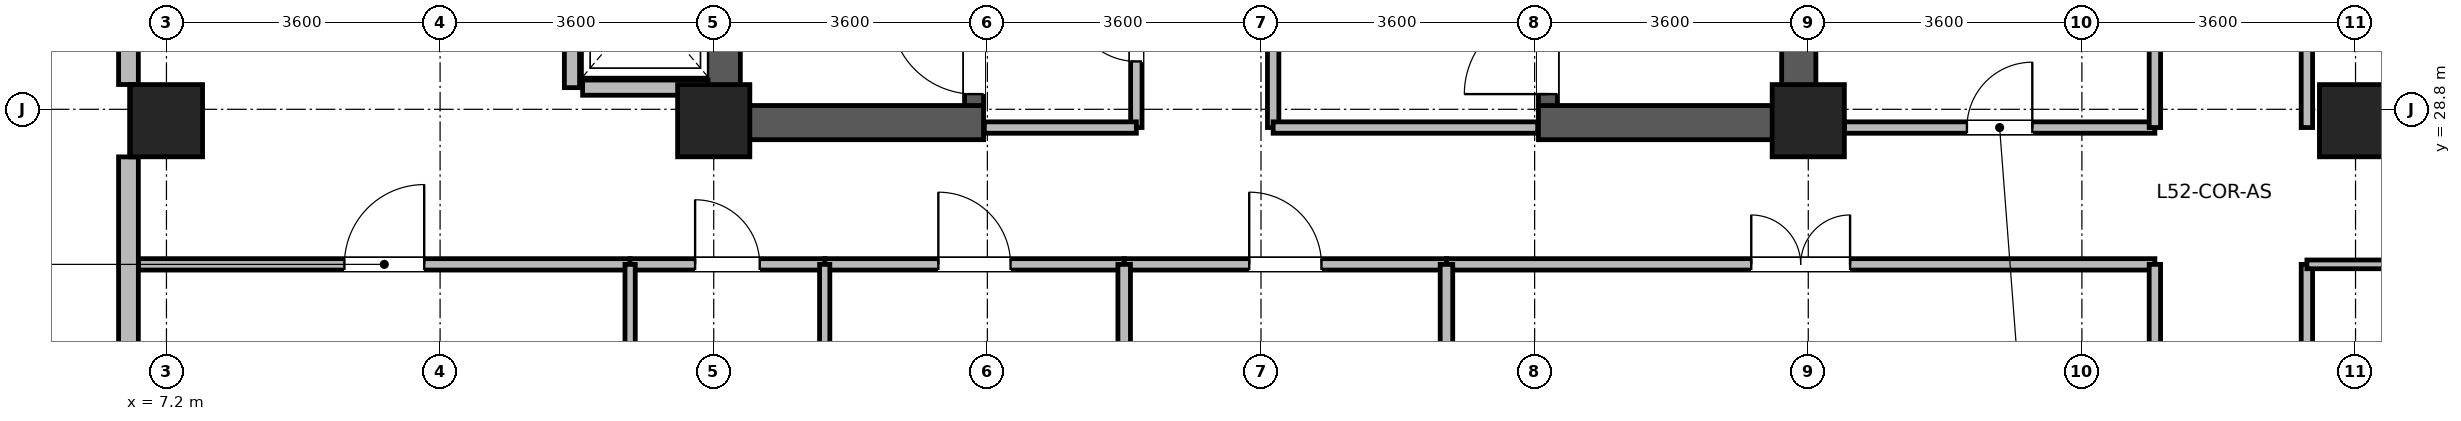
"""IFC4 building model, lengths in metres.
Left out: names, types, materials, properties, quantities, classifications, styles, units other than length and angle.
Written with IfcOpenShell. Run it as: python <this file> out.ifc"""

import sys

from ifc_helpers import new_model, si_unit, direction, frame, frame_2d, origin, origin_2d, place, context, subcontext, project, spatial, rectangle, extrude, source, transform, mapped, element, fill, save


model = new_model("IFC4")
c1 = context("Model", 3, precision=1e-05, world=origin(), true_north=direction((0.0, 1.0)))
c2 = subcontext(c1, "Body", "Model", "MODEL_VIEW")
j1 = project(units=[si_unit("LENGTHUNIT", "METRE"), si_unit("PLANEANGLEUNIT", "RADIAN")], contexts=[c1])
p1 = place(None, origin())
s1 = spatial("IfcSite", under=j1, at=p1, CompositionType="ELEMENT")
p2 = place(p1, origin())
s2 = spatial("IfcBuilding", under=s1, at=p2, CompositionType="ELEMENT")
p3 = place(p2, frame((0.0, 0.0, 205.5)))
s3 = spatial("IfcBuildingStorey", under=s2, at=p3, CompositionType="ELEMENT", Elevation=205.5)
for number, where, z_axis, x_axis in (
    (1, (14.525, 28.4, 0.0), (0.0, 0.0, 1.0), (0.0, 1.0, 0.0)),
    (2, (28.675, 28.4, 0.0), (0.0, 0.0, 1.0), (0.0, 1.0, 0.0)),
):
    element("IfcWall", number, at=place(p3, frame(where, z_axis=z_axis, x_axis=x_axis)), inside=s3, PredefinedType="SHEAR", context=c2, shape_type="SweptSolid", body=[
        extrude(rectangle(XDim=7.9, YDim=0.45, at=frame_2d((3.95, 0.0))), origin(), (0.0, 0.0, 1.0), 3.47),
    ])
for number, where, z_axis, x_axis in (
    (3, (14.75, 28.625, 0.0), (0.0, 0.0, 1.0), (1.0, 0.0, 0.0)),
    (4, (25.25, 28.625, 0.0), (0.0, 0.0, 1.0), (1.0, 0.0, 0.0)),
):
    element("IfcWall", number, at=place(p3, frame(where, z_axis=z_axis, x_axis=x_axis)), inside=s3, PredefinedType="SHEAR", context=c2, shape_type="SweptSolid", body=[
        extrude(rectangle(XDim=3.2, YDim=0.45, at=frame_2d((1.6, 0.0))), origin(), (0.0, 0.0, 1.0), 3.47),
    ])
p4 = place(p3, frame((17.825, 28.85, 0.0), z_axis=(0.0, 0.0, 1.0), x_axis=(0.0, 1.0, 0.0)))
e5 = element("IfcWall", 5, at=p4, inside=s3, PredefinedType="SHEAR", context=c2, shape_type="SweptSolid", body=[
    extrude(rectangle(XDim=7.0, YDim=0.25, at=frame_2d((3.5, 0.0))), origin(), (0.0, 0.0, 1.0), 3.47),
])
p5 = place(p4, frame((0.15, 0.0, 0.0)))
e6 = element("IfcOpeningElement", 6, at=p5, cuts=e5, PredefinedType="OPENING", context=c2, shape_type="SweptSolid", body=[
    extrude(rectangle(XDim=1.1, YDim=2.08, at=frame_2d((0.55, 1.04))), frame((0.0, 0.135, 0.0), z_axis=(0.0, -1.0, 0.0), x_axis=(1.0, 0.0, 0.0)), (0.0, 0.0, 1.0), 0.27),
])
p6 = place(p3, frame((25.375, 28.85, 0.0), z_axis=(0.0, 0.0, 1.0), x_axis=(0.0, 1.0, 0.0)))
e7 = element("IfcWall", 7, at=p6, inside=s3, PredefinedType="SHEAR", context=c2, shape_type="SweptSolid", body=[
    extrude(rectangle(XDim=7.0, YDim=0.25, at=frame_2d((3.5, 0.0))), origin(), (0.0, 0.0, 1.0), 3.47),
])
p7 = place(p6, frame((0.15, 0.0, 0.0)))
e8 = element("IfcOpeningElement", 8, at=p7, cuts=e7, PredefinedType="OPENING", context=c2, shape_type="SweptSolid", body=[
    extrude(rectangle(XDim=1.1, YDim=2.08, at=frame_2d((0.55, 1.04))), frame((0.0, 0.135, 0.0), z_axis=(0.0, -1.0, 0.0), x_axis=(1.0, 0.0, 0.0)), (0.0, 0.0, 1.0), 0.27),
])
m1 = source(origin(), c2, "Body", "SweptSolid", [
    extrude(rectangle(XDim=0.95, YDim=0.95, at=origin_2d()), origin(), (0.0, 0.0, 1.0), 3.7),
])
for number, where, z_axis, x_axis in (
    (9, (7.2, 28.65, 0.0), (0.0, 0.0, 1.0), (1.0, 0.0, 0.0)),
    (10, (14.4, 28.65, 0.0), (0.0, 0.0, 1.0), (1.0, 0.0, 0.0)),
    (11, (28.8, 28.65, 0.0), (0.0, 0.0, 1.0), (1.0, 0.0, 0.0)),
    (12, (36.0, 28.65, 0.0), (0.0, 0.0, 1.0), (1.0, 0.0, 0.0)),
):
    element("IfcColumn", number, at=place(p3, frame(where, z_axis=z_axis, x_axis=x_axis)), inside=s3, PredefinedType="COLUMN", context=c2, shape_type="MappedRepresentation", body=[
        mapped(m1, transform((0.0, 0.0, 0.0), x_axis=(1.0, 0.0, 0.0), y_axis=(0.0, 1.0, 0.0), z_axis=(0.0, 0.0, 1.0), scale=1.0)),
    ])
p8 = place(p3, frame((6.7, 29.126, 0.0), z_axis=(0.0, 0.0, 1.0), x_axis=(0.0, 1.0, 0.0)))
e13 = element("IfcWall", 13, at=p8, inside=s3, PredefinedType="STANDARD", context=c2, shape_type="SweptSolid", body=[
    extrude(rectangle(XDim=6.548, YDim=0.26, at=frame_2d((3.274, 0.0))), origin(), (0.0, 0.0, 1.0), 3.45),
])
p9 = place(p8, frame((0.737, 0.0, 0.85)))
e14 = element("IfcOpeningElement", 14, at=p9, cuts=e13, PredefinedType="OPENING", context=c2, shape_type="SweptSolid", body=[
    extrude(rectangle(XDim=1.8, YDim=1.85, at=frame_2d((0.9, 0.925))), frame((0.0, 0.14, 0.0), z_axis=(0.0, -1.0, 0.0), x_axis=(1.0, 0.0, 0.0)), (0.0, 0.0, 1.0), 0.28),
])
p10 = place(p8, frame((4.011, 0.0, 0.85)))
e15 = element("IfcOpeningElement", 15, at=p10, cuts=e13, PredefinedType="OPENING", context=c2, shape_type="SweptSolid", body=[
    extrude(rectangle(XDim=1.8, YDim=1.85, at=frame_2d((0.9, 0.925))), frame((0.0, 0.14, 0.0), z_axis=(0.0, -1.0, 0.0), x_axis=(1.0, 0.0, 0.0)), (0.0, 0.0, 1.0), 0.28),
])
p11 = place(p3, frame((6.7, 21.47, 0.0), z_axis=(0.0, 0.0, 1.0), x_axis=(0.0, 1.0, 0.0)))
e16 = element("IfcWall", 16, at=p11, inside=s3, PredefinedType="STANDARD", context=c2, shape_type="SweptSolid", body=[
    extrude(rectangle(XDim=6.704, YDim=0.26, at=frame_2d((3.352, 0.0))), origin(), (0.0, 0.0, 1.0), 3.45),
])
p12 = place(p11, frame((0.776, 0.0, 0.85)))
e17 = element("IfcOpeningElement", 17, at=p12, cuts=e16, PredefinedType="OPENING", context=c2, shape_type="SweptSolid", body=[
    extrude(rectangle(XDim=1.8, YDim=1.85, at=frame_2d((0.9, 0.925))), frame((0.0, 0.14, 0.0), z_axis=(0.0, -1.0, 0.0), x_axis=(1.0, 0.0, 0.0)), (0.0, 0.0, 1.0), 0.28),
])
p13 = place(p11, frame((2.877, 0.0, 0.85)))
e18 = element("IfcOpeningElement", 18, at=p13, cuts=e16, PredefinedType="OPENING", context=c2, shape_type="SweptSolid", body=[
    extrude(rectangle(XDim=0.95, YDim=1.75, at=frame_2d((0.475, 0.875))), frame((0.0, 0.14, 0.0), z_axis=(0.0, -1.0, 0.0), x_axis=(1.0, 0.0, 0.0)), (0.0, 0.0, 1.0), 0.28),
])
p14 = place(p3, frame((12.675, 29.085, 0.0), z_axis=(0.0, 0.0, 1.0), x_axis=(1.0, 0.0, 0.0)))
e19 = element("IfcWall", 19, at=p14, inside=s3, PredefinedType="PARTITIONING", context=c2, shape_type="SweptSolid", body=[
    extrude(rectangle(XDim=1.65, YDim=0.2, at=frame_2d((0.825, 0.0))), origin(), (0.0, 0.0, 1.0), 3.45),
])
p15 = place(p3, frame((12.535, 29.085, 0.0), z_axis=(0.0, 0.0, 1.0), x_axis=(0.0, 1.0, 0.0)))
e20 = element("IfcWall", 20, at=p15, inside=s3, PredefinedType="PARTITIONING", context=c2, shape_type="SweptSolid", body=[
    extrude(rectangle(XDim=2.23, YDim=0.2, at=frame_2d((1.115, 0.0))), origin(), (0.0, 0.0, 1.0), 3.45),
])
p16 = place(p3, frame((35.36, 16.96, 0.0), z_axis=(0.0, 0.0, 1.0), x_axis=(0.0, 1.0, 0.0)))
e21 = element("IfcWall", 21, at=p16, inside=s3, PredefinedType="PARTITIONING", context=c2, shape_type="SweptSolid", body=[
    extrude(rectangle(XDim=9.8, YDim=0.15, at=frame_2d((4.9, 0.0))), origin(), (0.0, 0.0, 1.0), 3.45),
])
p17 = place(p16, frame((2.486, 0.0, 0.0)))
e22 = element("IfcOpeningElement", 22, at=p17, cuts=e21, PredefinedType="OPENING", context=c2, shape_type="SweptSolid", body=[
    extrude(rectangle(XDim=1.3, YDim=2.12, at=frame_2d((0.65, 1.06))), frame((0.0, 0.085, 0.0), z_axis=(0.0, -1.0, 0.0), x_axis=(1.0, 0.0, 0.0)), (0.0, 0.0, 1.0), 0.17),
])
p18 = place(p3, frame((24.04, 26.76, 0.0), z_axis=(0.0, 0.0, 1.0), x_axis=(1.0, 0.0, 0.0)))
e23 = element("IfcWall", 23, at=p18, inside=s3, PredefinedType="PARTITIONING", context=c2, shape_type="SweptSolid", body=[
    extrude(rectangle(XDim=9.32, YDim=0.15, at=frame_2d((4.66, 0.0))), origin(), (0.0, 0.0, 1.0), 3.45),
])
p19 = place(p18, frame((4.01, 0.0, 0.0)))
e24 = element("IfcOpeningElement", 24, at=p19, cuts=e23, PredefinedType="OPENING", context=c2, shape_type="SweptSolid", body=[
    extrude(rectangle(XDim=1.3, YDim=2.12, at=frame_2d((0.65, 1.06))), frame((0.0, 0.085, 0.0), z_axis=(0.0, -1.0, 0.0), x_axis=(1.0, 0.0, 0.0)), (0.0, 0.0, 1.0), 0.17),
])
p20 = place(p3, frame((35.36, 28.56, 0.0), z_axis=(0.0, 0.0, 1.0), x_axis=(0.0, 1.0, 0.0)))
e25 = element("IfcWall", 25, at=p20, inside=s3, PredefinedType="PARTITIONING", context=c2, shape_type="SweptSolid", body=[
    extrude(rectangle(XDim=7.68, YDim=0.15, at=frame_2d((3.84, 0.0))), origin(), (0.0, 0.0, 1.0), 3.45),
])
p21 = place(p20, frame((3.19, 0.0, 0.0)))
e26 = element("IfcOpeningElement", 26, at=p21, cuts=e25, PredefinedType="OPENING", context=c2, shape_type="SweptSolid", body=[
    extrude(rectangle(XDim=1.3, YDim=2.12, at=frame_2d((0.65, 1.06))), frame((0.0, 0.085, 0.0), z_axis=(0.0, -1.0, 0.0), x_axis=(1.0, 0.0, 0.0)), (0.0, 0.0, 1.0), 0.17),
])
p22 = place(p3, frame((6.832, 26.76, 0.0), z_axis=(0.0, 0.0, 1.0), x_axis=(1.0, 0.0, 0.0)))
e27 = element("IfcWall", 27, at=p22, inside=s3, PredefinedType="PARTITIONING", context=c2, shape_type="SweptSolid", body=[
    extrude(rectangle(XDim=6.468, YDim=0.15, at=frame_2d((3.234, 0.0))), origin(), (0.0, 0.0, 1.0), 3.45),
])
p23 = place(p22, frame((2.709, 0.0, 0.0)))
e28 = element("IfcOpeningElement", 28, at=p23, cuts=e27, PredefinedType="OPENING", context=c2, shape_type="SweptSolid", body=[
    extrude(rectangle(XDim=1.05, YDim=2.12, at=frame_2d((0.525, 1.06))), frame((0.0, 0.085, 0.0), z_axis=(0.0, -1.0, 0.0), x_axis=(1.0, 0.0, 0.0)), (0.0, 0.0, 1.0), 0.17),
])
p24 = place(p3, frame((33.36, 21.6, 0.0), z_axis=(0.0, 0.0, 1.0), x_axis=(0.0, 1.0, 0.0)))
e29 = element("IfcWall", 29, at=p24, inside=s3, PredefinedType="PARTITIONING", context=c2, shape_type="SweptSolid", body=[
    extrude(rectangle(XDim=5.16, YDim=0.15, at=frame_2d((2.58, 0.0))), origin(), (0.0, 0.0, 1.0), 3.45),
])
p25 = place(p3, frame((29.275, 28.56, 0.0), z_axis=(0.0, 0.0, 1.0), x_axis=(1.0, 0.0, 0.0)))
e30 = element("IfcWall", 30, at=p25, inside=s3, PredefinedType="PARTITIONING", context=c2, shape_type="SweptSolid", body=[
    extrude(rectangle(XDim=4.085, YDim=0.15, at=frame_2d((2.042, 0.0))), origin(), (0.0, 0.0, 1.0), 2.85),
])
p26 = place(p25, frame((1.613, 0.0, 0.0)))
e31 = element("IfcOpeningElement", 31, at=p26, cuts=e30, PredefinedType="OPENING", context=c2, shape_type="SweptSolid", body=[
    extrude(rectangle(XDim=0.86, YDim=2.02, at=frame_2d((0.43, 1.01))), frame((0.0, 0.085, 0.0), z_axis=(0.0, -1.0, 0.0), x_axis=(1.0, 0.0, 0.0)), (0.0, 0.0, 1.0), 0.17),
])
p27 = place(p3, frame((19.8, 26.76, 0.0), z_axis=(0.0, 0.0, 1.0), x_axis=(1.0, 0.0, 0.0)))
e32 = element("IfcWall", 32, at=p27, inside=s3, PredefinedType="PARTITIONING", context=c2, shape_type="SweptSolid", body=[
    extrude(rectangle(XDim=4.24, YDim=0.15, at=frame_2d((2.12, 0.0))), origin(), (0.0, 0.0, 1.0), 3.45),
])
p28 = place(p27, frame((1.645, 0.0, 0.0)))
e33 = element("IfcOpeningElement", 33, at=p28, cuts=e32, PredefinedType="OPENING", context=c2, shape_type="SweptSolid", body=[
    extrude(rectangle(XDim=0.95, YDim=2.1, at=frame_2d((0.475, 1.05))), frame((0.0, 0.085, 0.0), z_axis=(0.0, -1.0, 0.0), x_axis=(1.0, 0.0, 0.0)), (0.0, 0.0, 1.0), 0.17),
])
p29 = place(p3, frame((15.86, 26.76, 0.0), z_axis=(0.0, 0.0, 1.0), x_axis=(1.0, 0.0, 0.0)))
e34 = element("IfcWall", 34, at=p29, inside=s3, PredefinedType="PARTITIONING", context=c2, shape_type="SweptSolid", body=[
    extrude(rectangle(XDim=3.94, YDim=0.15, at=frame_2d((1.97, 0.0))), origin(), (0.0, 0.0, 1.0), 3.45),
])
p30 = place(p29, frame((1.495, 0.0, 0.0)))
e35 = element("IfcOpeningElement", 35, at=p30, cuts=e34, PredefinedType="OPENING", context=c2, shape_type="SweptSolid", body=[
    extrude(rectangle(XDim=0.95, YDim=2.1, at=frame_2d((0.475, 1.05))), frame((0.0, 0.085, 0.0), z_axis=(0.0, -1.0, 0.0), x_axis=(1.0, 0.0, 0.0)), (0.0, 0.0, 1.0), 0.17),
])
p31 = place(p3, frame((33.36, 28.56, 0.0), z_axis=(0.0, 0.0, 1.0), x_axis=(0.0, 1.0, 0.0)))
e36 = element("IfcWall", 36, at=p31, inside=s3, PredefinedType="PARTITIONING", context=c2, shape_type="SweptSolid", body=[
    extrude(rectangle(XDim=3.84, YDim=0.15, at=frame_2d((1.92, 0.0))), origin(), (0.0, 0.0, 1.0), 3.45),
])
p32 = place(p3, frame((19.96, 28.56, 0.0), z_axis=(0.0, 0.0, 1.0), x_axis=(0.0, 1.0, 0.0)))
e37 = element("IfcWall", 37, at=p32, inside=s3, PredefinedType="PARTITIONING", context=c2, shape_type="SweptSolid", body=[
    extrude(rectangle(XDim=2.6, YDim=0.15, at=frame_2d((1.3, 0.0))), origin(), (0.0, 0.0, 1.0), 3.45),
])
p33 = place(p32, frame((0.87, 0.0, 0.0)))
e38 = element("IfcOpeningElement", 38, at=p33, cuts=e37, PredefinedType="OPENING", context=c2, shape_type="SweptSolid", body=[
    extrude(rectangle(XDim=0.86, YDim=2.02, at=frame_2d((0.43, 1.01))), frame((0.0, 0.085, 0.0), z_axis=(0.0, -1.0, 0.0), x_axis=(1.0, 0.0, 0.0)), (0.0, 0.0, 1.0), 0.17),
])
p34 = place(p3, frame((13.3, 26.76, 0.0), z_axis=(0.0, 0.0, 1.0), x_axis=(1.0, 0.0, 0.0)))
e39 = element("IfcWall", 39, at=p34, inside=s3, PredefinedType="PARTITIONING", context=c2, shape_type="SweptSolid", body=[
    extrude(rectangle(XDim=2.56, YDim=0.15, at=frame_2d((1.28, 0.0))), origin(), (0.0, 0.0, 1.0), 3.45),
])
p35 = place(p34, frame((0.855, 0.0, 0.0)))
e40 = element("IfcOpeningElement", 40, at=p35, cuts=e39, PredefinedType="OPENING", context=c2, shape_type="SweptSolid", body=[
    extrude(rectangle(XDim=0.85, YDim=2.04, at=frame_2d((0.425, 1.02))), frame((0.0, 0.085, 0.0), z_axis=(0.0, -1.0, 0.0), x_axis=(1.0, 0.0, 0.0)), (0.0, 0.0, 1.0), 0.17),
])
p36 = place(p3, frame((17.96, 28.56, 0.0), z_axis=(0.0, 0.0, 1.0), x_axis=(1.0, 0.0, 0.0)))
e41 = element("IfcWall", 41, at=p36, inside=s3, PredefinedType="PARTITIONING", context=c2, shape_type="SweptSolid", body=[
    extrude(rectangle(XDim=2.0, YDim=0.15, at=frame_2d((1.0, 0.0))), origin(), (0.0, 0.0, 1.0), 2.45),
])
p37 = place(p3, frame((35.36, 26.76, 0.0), z_axis=(0.0, 0.0, 1.0), x_axis=(1.0, 0.0, 0.0)))
e42 = element("IfcWall", 42, at=p37, inside=s3, PredefinedType="PARTITIONING", context=c2, shape_type="SweptSolid", body=[
    extrude(rectangle(XDim=9.16, YDim=0.115, at=frame_2d((4.58, 0.0))), origin(), (0.0, 0.0, 1.0), 3.45),
])
p38 = place(p3, frame((15.86, 21.62, 0.0), z_axis=(0.0, 0.0, 1.0), x_axis=(0.0, 1.0, 0.0)))
e43 = element("IfcWall", 43, at=p38, inside=s3, PredefinedType="PARTITIONING", context=c2, shape_type="SweptSolid", body=[
    extrude(rectangle(XDim=5.14, YDim=0.135, at=frame_2d((2.57, 0.0))), origin(), (0.0, 0.0, 1.0), 3.45),
])
for number, where, z_axis, x_axis in (
    (44, (19.8, 21.62, 0.0), (0.0, 0.0, 1.0), (0.0, 1.0, 0.0)),
    (45, (24.04, 21.62, 0.0), (0.0, 0.0, 1.0), (0.0, 1.0, 0.0)),
):
    element("IfcWall", number, at=place(p3, frame(where, z_axis=z_axis, x_axis=x_axis)), inside=s3, PredefinedType="PARTITIONING", context=c2, shape_type="SweptSolid", body=[
        extrude(rectangle(XDim=5.14, YDim=0.165, at=frame_2d((2.57, 0.0))), origin(), (0.0, 0.0, 1.0), 3.45),
    ])
p39 = place(p3, frame((21.76, 28.56, 0.0), z_axis=(0.0, 0.0, 1.0), x_axis=(0.0, 1.0, 0.0)))
e46 = element("IfcWall", 46, at=p39, inside=s3, PredefinedType="PARTITIONING", context=c2, shape_type="SweptSolid", body=[
    extrude(rectangle(XDim=4.6, YDim=0.15, at=frame_2d((2.3, 0.0))), origin(), (0.0, 0.0, 1.0), 3.45),
])
p40 = place(p39, frame((1.55, 0.0, 0.0)))
e47 = element("IfcOpeningElement", 47, at=p40, cuts=e46, PredefinedType="OPENING", context=c2, shape_type="SweptSolid", body=[
    extrude(rectangle(XDim=1.5, YDim=2.1, at=frame_2d((0.75, 1.05))), frame((0.0, 0.085, 0.0), z_axis=(0.0, -1.0, 0.0), x_axis=(1.0, 0.0, 0.0)), (0.0, 0.0, 1.0), 0.17),
])
p41 = place(p3, frame((21.76, 28.56, 0.0), z_axis=(0.0, 0.0, 1.0), x_axis=(1.0, 0.0, 0.0)))
e48 = element("IfcWall", 48, at=p41, inside=s3, PredefinedType="PARTITIONING", context=c2, shape_type="SweptSolid", body=[
    extrude(rectangle(XDim=3.48, YDim=0.15, at=frame_2d((1.74, 0.0))), origin(), (0.0, 0.0, 1.0), 2.45),
])
p42 = place(p3, frame((13.3, 23.5, 0.0), z_axis=(0.0, 0.0, 1.0), x_axis=(0.0, 1.0, 0.0)))
e49 = element("IfcWall", 49, at=p42, inside=s3, PredefinedType="PARTITIONING", context=c2, shape_type="SweptSolid", body=[
    extrude(rectangle(XDim=3.26, YDim=0.135, at=frame_2d((1.63, 0.0))), origin(), (0.0, 0.0, 1.0), 3.45),
])
p43 = place(p5, origin())
e50 = element("IfcDoor", 50, at=p43, inside=s3, OperationType="SINGLE_SWING_RIGHT", PredefinedType="DOOR", context=c2, shape_type="SweptSolid", body=[
    extrude(rectangle(XDim=1.1, YDim=2.08, at=frame_2d((0.55, 1.04))), frame((0.0, 0.025, 0.0), z_axis=(0.0, -1.0, 0.0), x_axis=(1.0, 0.0, 0.0)), (0.0, 0.0, 1.0), 0.05),
])
fill(e6, e50)
p44 = place(p7, origin())
e51 = element("IfcDoor", 51, at=p44, inside=s3, OperationType="SINGLE_SWING_LEFT", PredefinedType="DOOR", context=c2, shape_type="SweptSolid", body=[
    extrude(rectangle(XDim=1.1, YDim=2.08, at=frame_2d((0.55, 1.04))), frame((0.0, 0.025, 0.0), z_axis=(0.0, -1.0, 0.0), x_axis=(1.0, 0.0, 0.0)), (0.0, 0.0, 1.0), 0.05),
])
fill(e8, e51)
p45 = place(p19, origin())
e52 = element("IfcDoor", 52, at=p45, inside=s3, OperationType="DOUBLE_DOOR_SINGLE_SWING", PredefinedType="DOOR", context=c2, shape_type="SweptSolid", body=[
    extrude(rectangle(XDim=1.3, YDim=2.12, at=frame_2d((0.65, 1.06))), frame((0.0, 0.025, 0.0), z_axis=(0.0, -1.0, 0.0), x_axis=(1.0, 0.0, 0.0)), (0.0, 0.0, 1.0), 0.05),
])
fill(e24, e52)
p46 = place(p23, origin())
e53 = element("IfcDoor", 53, at=p46, inside=s3, OperationType="SINGLE_SWING_RIGHT", PredefinedType="DOOR", context=c2, shape_type="SweptSolid", body=[
    extrude(rectangle(XDim=1.05, YDim=2.12, at=frame_2d((0.525, 1.06))), frame((0.0, 0.025, 0.0), z_axis=(0.0, -1.0, 0.0), x_axis=(1.0, 0.0, 0.0)), (0.0, 0.0, 1.0), 0.05),
])
fill(e28, e53)
p47 = place(p26, origin())
e54 = element("IfcDoor", 54, at=p47, inside=s3, OperationType="SINGLE_SWING_RIGHT", PredefinedType="DOOR", context=c2, shape_type="SweptSolid", body=[
    extrude(rectangle(XDim=0.86, YDim=2.02, at=frame_2d((0.43, 1.01))), frame((0.0, 0.025, 0.0), z_axis=(0.0, -1.0, 0.0), x_axis=(1.0, 0.0, 0.0)), (0.0, 0.0, 1.0), 0.05),
])
fill(e31, e54)
p48 = place(p28, origin())
e55 = element("IfcDoor", 55, at=p48, inside=s3, OperationType="SINGLE_SWING_LEFT", PredefinedType="DOOR", context=c2, shape_type="SweptSolid", body=[
    extrude(rectangle(XDim=0.95, YDim=2.1, at=frame_2d((0.475, 1.05))), frame((0.0, 0.025, 0.0), z_axis=(0.0, -1.0, 0.0), x_axis=(1.0, 0.0, 0.0)), (0.0, 0.0, 1.0), 0.05),
])
fill(e33, e55)
p49 = place(p30, origin())
e56 = element("IfcDoor", 56, at=p49, inside=s3, OperationType="SINGLE_SWING_LEFT", PredefinedType="DOOR", context=c2, shape_type="SweptSolid", body=[
    extrude(rectangle(XDim=0.95, YDim=2.1, at=frame_2d((0.475, 1.05))), frame((0.0, 0.025, 0.0), z_axis=(0.0, -1.0, 0.0), x_axis=(1.0, 0.0, 0.0)), (0.0, 0.0, 1.0), 0.05),
])
fill(e35, e56)
p50 = place(p33, origin())
e57 = element("IfcDoor", 57, at=p50, inside=s3, OperationType="SINGLE_SWING_RIGHT", PredefinedType="DOOR", context=c2, shape_type="SweptSolid", body=[
    extrude(rectangle(XDim=0.86, YDim=2.02, at=frame_2d((0.43, 1.01))), frame((0.0, 0.025, 0.0), z_axis=(0.0, -1.0, 0.0), x_axis=(1.0, 0.0, 0.0)), (0.0, 0.0, 1.0), 0.05),
])
fill(e38, e57)
p51 = place(p35, origin())
e58 = element("IfcDoor", 58, at=p51, inside=s3, OperationType="SINGLE_SWING_LEFT", PredefinedType="DOOR", context=c2, shape_type="SweptSolid", body=[
    extrude(rectangle(XDim=0.85, YDim=2.04, at=frame_2d((0.425, 1.02))), frame((0.0, 0.025, 0.0), z_axis=(0.0, -1.0, 0.0), x_axis=(1.0, 0.0, 0.0)), (0.0, 0.0, 1.0), 0.05),
])
fill(e40, e58)
save(model, sys.argv[1])
